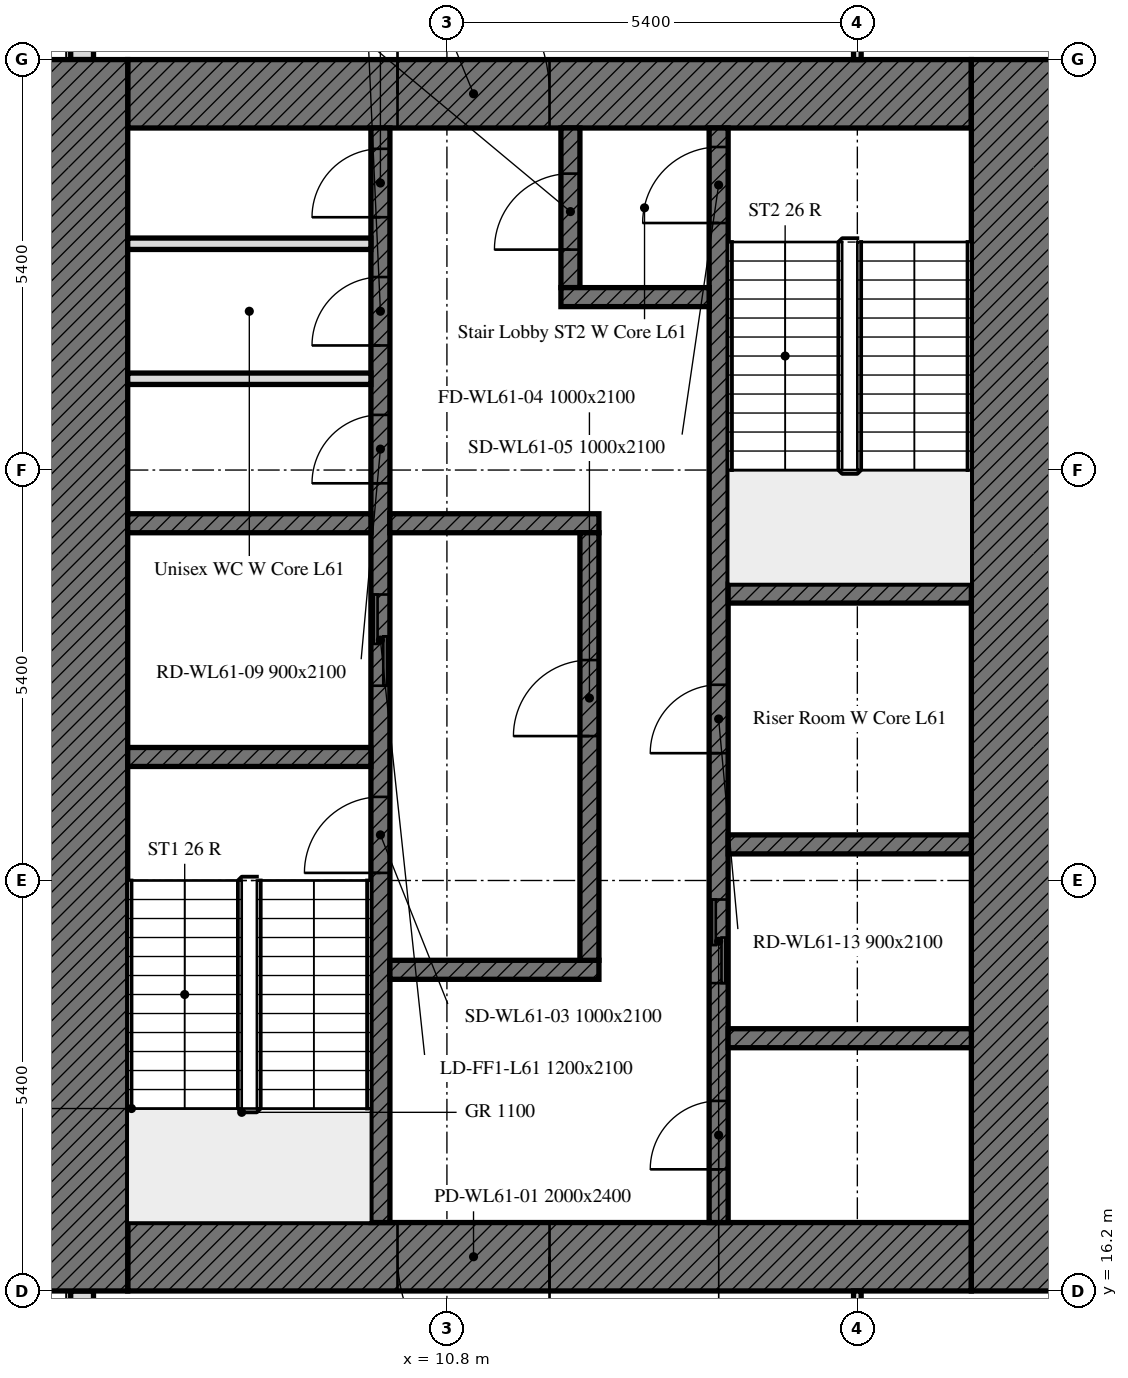
"""IFC4 building model, lengths in metres.
Left out: names, types, materials, properties, quantities, classifications, styles, units other than length and angle.
Written with IfcOpenShell. Run it as: python <this file> out.ifc"""

import sys

from ifc_helpers import new_model, si_unit, direction, frame, frame_2d, origin, place, context, subcontext, project, spatial, rectangle, extrude, element, fill, save


model = new_model("IFC4")
c1 = context("Model", 3, precision=1e-05, world=origin(), true_north=direction((0.0, 1.0)))
c2 = subcontext(c1, "Body", "Model", "MODEL_VIEW")
j1 = project(units=[si_unit("LENGTHUNIT", "METRE"), si_unit("PLANEANGLEUNIT", "RADIAN")], contexts=[c1])
p1 = place(None, origin())
s1 = spatial("IfcSite", under=j1, at=p1, CompositionType="ELEMENT")
p2 = place(p1, origin())
s2 = spatial("IfcBuilding", under=s1, at=p2, CompositionType="ELEMENT")
p3 = place(p2, frame((0.0, 0.0, 250.9)))
s3 = spatial("IfcBuildingStorey", under=s2, at=p3, CompositionType="ELEMENT", Elevation=250.9)
p4 = place(p3, frame((6.0, 37.8, 0.0), z_axis=(0.0, 0.0, 1.0), x_axis=(0.0, -1.0, 0.0)))
e1 = element("IfcWall", 1, at=p4, inside=s3, PredefinedType="SOLIDWALL", context=c2, shape_type="SweptSolid", body=[
    extrude(rectangle(XDim=5.4, YDim=0.3, at=frame_2d((2.7, 0.0))), origin(), (0.0, 0.0, 1.0), 4.5),
])
p5 = place(p4, frame((1.0, 0.0, 0.0)))
e2 = element("IfcOpeningElement", 2, at=p5, cuts=e1, PredefinedType="OPENING", context=c2, shape_type="SweptSolid", body=[
    extrude(rectangle(XDim=1.2, YDim=2.4, at=frame_2d((0.6, 1.2))), frame((0.0, 0.16, 0.0), z_axis=(0.0, -1.0, 0.0), x_axis=(1.0, 0.0, 0.0)), (0.0, 0.0, 1.0), 0.32),
])
p6 = place(p3, frame((6.0, 16.2, 0.0), z_axis=(0.0, 0.0, 1.0), x_axis=(0.0, -1.0, 0.0)))
e3 = element("IfcWall", 3, at=p6, inside=s3, PredefinedType="SOLIDWALL", context=c2, shape_type="SweptSolid", body=[
    extrude(rectangle(XDim=5.4, YDim=0.3, at=frame_2d((2.7, 0.0))), origin(), (0.0, 0.0, 1.0), 4.5),
])
p7 = place(p6, frame((3.2, 0.0, 0.0)))
e4 = element("IfcOpeningElement", 4, at=p7, cuts=e3, PredefinedType="OPENING", context=c2, shape_type="SweptSolid", body=[
    extrude(rectangle(XDim=1.2, YDim=2.4, at=frame_2d((0.6, 1.2))), frame((0.0, 0.16, 0.0), z_axis=(0.0, -1.0, 0.0), x_axis=(1.0, 0.0, 0.0)), (0.0, 0.0, 1.0), 0.32),
])
p8 = place(p3, frame((17.7, 16.65, 0.0), z_axis=(0.0, 0.0, 1.0), x_axis=(-1.0, 0.0, 0.0)))
e5 = element("IfcWall", 5, at=p8, inside=s3, PredefinedType="SOLIDWALL", context=c2, shape_type="SweptSolid", body=[
    extrude(rectangle(XDim=11.1, YDim=0.9, at=frame_2d((5.55, 0.0))), origin(), (0.0, 0.0, 1.0), 4.5),
])
p9 = place(p8, frame((5.55, 0.0, 0.0)))
e6 = element("IfcOpeningElement", 6, at=p9, cuts=e5, PredefinedType="OPENING", context=c2, shape_type="SweptSolid", body=[
    extrude(rectangle(XDim=2.0, YDim=2.4, at=frame_2d((1.0, 1.2))), frame((0.0, 0.45, 0.0), z_axis=(0.0, -1.0, 0.0), x_axis=(1.0, 0.0, 0.0)), (0.0, 0.0, 1.0), 0.9),
])
p10 = place(p3, frame((6.6, 31.95, 0.0), z_axis=(0.0, 0.0, 1.0), x_axis=(1.0, 0.0, 0.0)))
e7 = element("IfcWall", 7, at=p10, inside=s3, PredefinedType="SOLIDWALL", context=c2, shape_type="SweptSolid", body=[
    extrude(rectangle(XDim=11.1, YDim=0.9, at=frame_2d((5.55, 0.0))), origin(), (0.0, 0.0, 1.0), 4.5),
])
p11 = place(p10, frame((3.55, 0.0, 0.0)))
e8 = element("IfcOpeningElement", 8, at=p11, cuts=e7, PredefinedType="OPENING", context=c2, shape_type="SweptSolid", body=[
    extrude(rectangle(XDim=2.0, YDim=2.4, at=frame_2d((1.0, 1.2))), frame((0.0, 0.45, 0.0), z_axis=(0.0, -1.0, 0.0), x_axis=(1.0, 0.0, 0.0)), (0.0, 0.0, 1.0), 0.9),
])
for number, where, z_axis, x_axis in (
    (9, (6.0, 16.2, 0.0), (0.0, 0.0, 1.0), (0.0, 1.0, 0.0)),
    (10, (18.3, 32.4, 0.0), (0.0, 0.0, 1.0), (0.0, -1.0, 0.0)),
):
    element("IfcWall", number, at=place(p3, frame(where, z_axis=z_axis, x_axis=x_axis)), inside=s3, PredefinedType="SOLIDWALL", context=c2, shape_type="SweptSolid", body=[
        extrude(rectangle(XDim=16.2, YDim=1.2, at=frame_2d((8.1, 0.0))), origin(), (0.0, 0.0, 1.0), 4.5),
    ])
p12 = place(p3, frame((9.925, 17.1, 0.0), z_axis=(0.0, 0.0, 1.0), x_axis=(0.0, 1.0, 0.0)))
e11 = element("IfcWall", 11, at=p12, inside=s3, PredefinedType="SOLIDWALL", context=c2, shape_type="SweptSolid", body=[
    extrude(rectangle(XDim=14.4, YDim=0.25, at=frame_2d((7.2, 0.0))), origin(), (0.0, 0.0, 1.0), 4.5),
])
p13 = place(p12, frame((4.6, 0.0, 0.0)))
e12 = element("IfcOpeningElement", 12, at=p13, cuts=e11, PredefinedType="OPENING", context=c2, shape_type="SweptSolid", body=[
    extrude(rectangle(XDim=1.0, YDim=2.1, at=frame_2d((0.5, 1.05))), frame((0.0, 0.125, 0.0), z_axis=(0.0, -1.0, 0.0), x_axis=(1.0, 0.0, 0.0)), (0.0, 0.0, 1.0), 0.25),
])
p14 = place(p12, frame((7.062, 0.0, 0.0)))
e13 = element("IfcOpeningElement", 13, at=p14, cuts=e11, PredefinedType="OPENING", context=c2, shape_type="SweptSolid", body=[
    extrude(rectangle(XDim=1.2, YDim=2.1, at=frame_2d((0.6, 1.05))), frame((0.0, 0.125, 0.0), z_axis=(0.0, -1.0, 0.0), x_axis=(1.0, 0.0, 0.0)), (0.0, 0.0, 1.0), 0.25),
])
p15 = place(p12, frame((9.726, 0.0, 0.0)))
e14 = element("IfcOpeningElement", 14, at=p15, cuts=e11, PredefinedType="OPENING", context=c2, shape_type="SweptSolid", body=[
    extrude(rectangle(XDim=0.9, YDim=2.1, at=frame_2d((0.45, 1.05))), frame((0.0, 0.125, 0.0), z_axis=(0.0, -1.0, 0.0), x_axis=(1.0, 0.0, 0.0)), (0.0, 0.0, 1.0), 0.25),
])
p16 = place(p12, frame((11.539, 0.0, 0.0)))
e15 = element("IfcOpeningElement", 15, at=p16, cuts=e11, PredefinedType="OPENING", context=c2, shape_type="SweptSolid", body=[
    extrude(rectangle(XDim=0.9, YDim=2.1, at=frame_2d((0.45, 1.05))), frame((0.0, 0.125, 0.0), z_axis=(0.0, -1.0, 0.0), x_axis=(1.0, 0.0, 0.0)), (0.0, 0.0, 1.0), 0.25),
])
p17 = place(p12, frame((13.226, 0.0, 0.0)))
e16 = element("IfcOpeningElement", 16, at=p17, cuts=e11, PredefinedType="OPENING", context=c2, shape_type="SweptSolid", body=[
    extrude(rectangle(XDim=0.9, YDim=2.1, at=frame_2d((0.45, 1.05))), frame((0.0, 0.125, 0.0), z_axis=(0.0, -1.0, 0.0), x_axis=(1.0, 0.0, 0.0)), (0.0, 0.0, 1.0), 0.25),
])
p18 = place(p3, frame((14.375, 17.1, 0.0), z_axis=(0.0, 0.0, 1.0), x_axis=(0.0, 1.0, 0.0)))
e17 = element("IfcWall", 17, at=p18, inside=s3, PredefinedType="SOLIDWALL", context=c2, shape_type="SweptSolid", body=[
    extrude(rectangle(XDim=14.4, YDim=0.25, at=frame_2d((7.2, 0.0))), origin(), (0.0, 0.0, 1.0), 4.5),
])
p19 = place(p18, frame((13.15, 0.0, 0.0)))
e18 = element("IfcOpeningElement", 18, at=p19, cuts=e17, PredefinedType="OPENING", context=c2, shape_type="SweptSolid", body=[
    extrude(rectangle(XDim=1.0, YDim=2.1, at=frame_2d((0.5, 1.05))), frame((0.0, 0.125, 0.0), z_axis=(0.0, -1.0, 0.0), x_axis=(1.0, 0.0, 0.0)), (0.0, 0.0, 1.0), 0.25),
])
p20 = place(p18, frame((3.15, 0.0, 0.0)))
e19 = element("IfcOpeningElement", 19, at=p20, cuts=e17, PredefinedType="OPENING", context=c2, shape_type="SweptSolid", body=[
    extrude(rectangle(XDim=1.1, YDim=2.1, at=frame_2d((0.55, 1.05))), frame((0.0, 0.125, 0.0), z_axis=(0.0, -1.0, 0.0), x_axis=(1.0, 0.0, 0.0)), (0.0, 0.0, 1.0), 0.25),
])
p21 = place(p18, frame((0.7, 0.0, 0.0)))
e20 = element("IfcOpeningElement", 20, at=p21, cuts=e17, PredefinedType="OPENING", context=c2, shape_type="SweptSolid", body=[
    extrude(rectangle(XDim=0.9, YDim=2.1, at=frame_2d((0.45, 1.05))), frame((0.0, 0.125, 0.0), z_axis=(0.0, -1.0, 0.0), x_axis=(1.0, 0.0, 0.0)), (0.0, 0.0, 1.0), 0.25),
])
p22 = place(p18, frame((6.175, 0.0, 0.0)))
e21 = element("IfcOpeningElement", 21, at=p22, cuts=e17, PredefinedType="OPENING", context=c2, shape_type="SweptSolid", body=[
    extrude(rectangle(XDim=0.9, YDim=2.1, at=frame_2d((0.45, 1.05))), frame((0.0, 0.125, 0.0), z_axis=(0.0, -1.0, 0.0), x_axis=(1.0, 0.0, 0.0)), (0.0, 0.0, 1.0), 0.25),
])
for number, where, z_axis, x_axis in (
    (22, (6.6, 23.225, 0.0), (0.0, 0.0, 1.0), (1.0, 0.0, 0.0)),
    (23, (14.5, 25.375, 0.0), (0.0, 0.0, 1.0), (1.0, 0.0, 0.0)),
    (24, (14.5, 22.075, 0.0), (0.0, 0.0, 1.0), (1.0, 0.0, 0.0)),
    (25, (6.6, 26.3, 0.0), (0.0, 0.0, 1.0), (1.0, 0.0, 0.0)),
):
    element("IfcWall", number, at=place(p3, frame(where, z_axis=z_axis, x_axis=x_axis)), inside=s3, PredefinedType="SOLIDWALL", context=c2, shape_type="SweptSolid", body=[
        extrude(rectangle(XDim=3.2, YDim=0.25, at=frame_2d((1.6, 0.0))), origin(), (0.0, 0.0, 1.0), 4.5),
    ])
for number, where, z_axis, x_axis in (
    (26, (10.05, 26.3, 0.0), (0.0, 0.0, 1.0), (1.0, 0.0, 0.0)),
    (27, (10.05, 20.425, 0.0), (0.0, 0.0, 1.0), (1.0, 0.0, 0.0)),
):
    element("IfcWall", number, at=place(p3, frame(where, z_axis=z_axis, x_axis=x_axis)), inside=s3, PredefinedType="SOLIDWALL", context=c2, shape_type="SweptSolid", body=[
        extrude(rectangle(XDim=2.75, YDim=0.25, at=frame_2d((1.375, 0.0))), origin(), (0.0, 0.0, 1.0), 4.5),
    ])
p23 = place(p3, frame((12.425, 29.4, 0.0), z_axis=(0.0, 0.0, 1.0), x_axis=(0.0, 1.0, 0.0)))
e28 = element("IfcWall", 28, at=p23, inside=s3, PredefinedType="SOLIDWALL", context=c2, shape_type="SweptSolid", body=[
    extrude(rectangle(XDim=2.1, YDim=0.25, at=frame_2d((1.05, 0.0))), origin(), (0.0, 0.0, 1.0), 4.5),
])
p24 = place(p23, frame((0.5, 0.0, 0.0)))
e29 = element("IfcOpeningElement", 29, at=p24, cuts=e28, PredefinedType="OPENING", context=c2, shape_type="SweptSolid", body=[
    extrude(rectangle(XDim=1.0, YDim=2.1, at=frame_2d((0.5, 1.05))), frame((0.0, 0.125, 0.0), z_axis=(0.0, -1.0, 0.0), x_axis=(1.0, 0.0, 0.0)), (0.0, 0.0, 1.0), 0.25),
])
p25 = place(p3, frame((12.3, 29.275, 0.0), z_axis=(0.0, 0.0, 1.0), x_axis=(1.0, 0.0, 0.0)))
e30 = element("IfcWall", 30, at=p25, inside=s3, PredefinedType="SOLIDWALL", context=c2, shape_type="SweptSolid", body=[
    extrude(rectangle(XDim=1.95, YDim=0.25, at=frame_2d((0.975, 0.0))), origin(), (0.0, 0.0, 1.0), 4.5),
])
p26 = place(p3, frame((12.675, 20.55, 0.0), z_axis=(0.0, 0.0, 1.0), x_axis=(0.0, 1.0, 0.0)))
e31 = element("IfcWall", 31, at=p26, inside=s3, PredefinedType="SOLIDWALL", context=c2, shape_type="SweptSolid", body=[
    extrude(rectangle(XDim=5.625, YDim=0.25, at=frame_2d((2.812, 0.0))), origin(), (0.0, 0.0, 1.0), 4.5),
])
p27 = place(p26, frame((2.95, 0.0, 0.0)))
e32 = element("IfcOpeningElement", 32, at=p27, cuts=e31, PredefinedType="OPENING", context=c2, shape_type="SweptSolid", body=[
    extrude(rectangle(XDim=1.0, YDim=2.1, at=frame_2d((0.5, 1.05))), frame((0.0, 0.125, 0.0), z_axis=(0.0, -1.0, 0.0), x_axis=(1.0, 0.0, 0.0)), (0.0, 0.0, 1.0), 0.25),
])
p28 = place(p3, frame((14.5, 19.525, 0.0), z_axis=(0.0, 0.0, 1.0), x_axis=(1.0, 0.0, 0.0)))
e33 = element("IfcWall", 33, at=p28, inside=s3, PredefinedType="SOLIDWALL", context=c2, shape_type="SweptSolid", body=[
    extrude(rectangle(XDim=3.2, YDim=0.25, at=frame_2d((1.6, 0.0))), origin(), (0.0, 0.0, 1.0), 4.5),
])
for number, where, z_axis, x_axis in (
    (34, (6.6, 28.201, 0.0), (0.0, 0.0, 1.0), (1.0, 0.0, 0.0)),
    (35, (6.6, 29.977, 0.0), (0.0, 0.0, 1.0), (1.0, 0.0, 0.0)),
):
    element("IfcWall", number, at=place(p3, frame(where, z_axis=z_axis, x_axis=x_axis)), inside=s3, PredefinedType="PARTITIONING", context=c2, shape_type="SweptSolid", body=[
        extrude(rectangle(XDim=3.2, YDim=0.15, at=frame_2d((1.6, 0.0))), origin(), (0.0, 0.0, 1.0), 4.5),
    ])
p29 = place(p3, frame((16.2, 35.475, 0.0), z_axis=(0.0, 0.0, 1.0), x_axis=(0.0, -1.0, 0.0)))
e36 = element("IfcWall", 36, at=p29, inside=s3, PredefinedType="PARTITIONING", context=c2, shape_type="SweptSolid", body=[
    extrude(rectangle(XDim=3.075, YDim=0.1, at=frame_2d((1.538, 0.0))), origin(), (0.0, 0.0, 1.0), 3.75),
])
p30 = place(p3, frame((16.2, 16.2, 0.0), z_axis=(0.0, 0.0, 1.0), x_axis=(0.0, -1.0, 0.0)))
e37 = element("IfcWall", 37, at=p30, inside=s3, PredefinedType="PARTITIONING", context=c2, shape_type="SweptSolid", body=[
    extrude(rectangle(XDim=3.075, YDim=0.1, at=frame_2d((1.538, 0.0))), origin(), (0.0, 0.0, 1.0), 3.75),
])
p31 = place(p9, origin())
e38 = element("IfcDoor", 38, at=p31, inside=s3, OperationType="DOUBLE_DOOR_SINGLE_SWING", PredefinedType="DOOR", context=c2, shape_type="SweptSolid", body=[
    extrude(rectangle(XDim=2.0, YDim=2.4, at=frame_2d((1.0, 1.2))), frame((0.0, 0.025, 0.0), z_axis=(0.0, -1.0, 0.0), x_axis=(1.0, 0.0, 0.0)), (0.0, 0.0, 1.0), 0.05),
])
fill(e6, e38)
p32 = place(p11, origin())
e39 = element("IfcDoor", 39, at=p32, inside=s3, OperationType="DOUBLE_DOOR_SINGLE_SWING", PredefinedType="DOOR", context=c2, shape_type="SweptSolid", body=[
    extrude(rectangle(XDim=2.0, YDim=2.4, at=frame_2d((1.0, 1.2))), frame((0.0, 0.025, 0.0), z_axis=(0.0, -1.0, 0.0), x_axis=(1.0, 0.0, 0.0)), (0.0, 0.0, 1.0), 0.05),
])
fill(e8, e39)
p33 = place(p13, origin())
e40 = element("IfcDoor", 40, at=p33, inside=s3, OperationType="SINGLE_SWING_LEFT", PredefinedType="DOOR", context=c2, shape_type="SweptSolid", body=[
    extrude(rectangle(XDim=1.0, YDim=2.1, at=frame_2d((0.5, 1.05))), frame((0.0, 0.025, 0.0), z_axis=(0.0, -1.0, 0.0), x_axis=(1.0, 0.0, 0.0)), (0.0, 0.0, 1.0), 0.05),
])
fill(e12, e40)
p34 = place(p27, origin())
e41 = element("IfcDoor", 41, at=p34, inside=s3, OperationType="SINGLE_SWING_LEFT", PredefinedType="DOOR", context=c2, shape_type="SweptSolid", body=[
    extrude(rectangle(XDim=1.0, YDim=2.1, at=frame_2d((0.5, 1.05))), frame((0.0, 0.025, 0.0), z_axis=(0.0, -1.0, 0.0), x_axis=(1.0, 0.0, 0.0)), (0.0, 0.0, 1.0), 0.05),
])
fill(e32, e41)
p35 = place(p19, origin())
e42 = element("IfcDoor", 42, at=p35, inside=s3, OperationType="SINGLE_SWING_LEFT", PredefinedType="DOOR", context=c2, shape_type="SweptSolid", body=[
    extrude(rectangle(XDim=1.0, YDim=2.1, at=frame_2d((0.5, 1.05))), frame((0.0, 0.025, 0.0), z_axis=(0.0, -1.0, 0.0), x_axis=(1.0, 0.0, 0.0)), (0.0, 0.0, 1.0), 0.05),
])
fill(e18, e42)
p36 = place(p24, origin())
e43 = element("IfcDoor", 43, at=p36, inside=s3, OperationType="SINGLE_SWING_LEFT", PredefinedType="DOOR", context=c2, shape_type="SweptSolid", body=[
    extrude(rectangle(XDim=1.0, YDim=2.1, at=frame_2d((0.5, 1.05))), frame((0.0, 0.025, 0.0), z_axis=(0.0, -1.0, 0.0), x_axis=(1.0, 0.0, 0.0)), (0.0, 0.0, 1.0), 0.05),
])
fill(e29, e43)
p37 = place(p14, origin())
e44 = element("IfcDoor", 44, at=p37, inside=s3, OperationType="DOUBLE_DOOR_SLIDING", PredefinedType="DOOR", context=c2, shape_type="SweptSolid", body=[
    extrude(rectangle(XDim=1.2, YDim=2.1, at=frame_2d((0.6, 1.05))), frame((0.0, 0.025, 0.0), z_axis=(0.0, -1.0, 0.0), x_axis=(1.0, 0.0, 0.0)), (0.0, 0.0, 1.0), 0.05),
])
fill(e13, e44)
p38 = place(p20, origin())
e45 = element("IfcDoor", 45, at=p38, inside=s3, OperationType="DOUBLE_DOOR_SLIDING", PredefinedType="DOOR", context=c2, shape_type="SweptSolid", body=[
    extrude(rectangle(XDim=1.1, YDim=2.1, at=frame_2d((0.55, 1.05))), frame((0.0, 0.025, 0.0), z_axis=(0.0, -1.0, 0.0), x_axis=(1.0, 0.0, 0.0)), (0.0, 0.0, 1.0), 0.05),
])
fill(e19, e45)
p39 = place(p15, origin())
e46 = element("IfcDoor", 46, at=p39, inside=s3, OperationType="SINGLE_SWING_LEFT", PredefinedType="DOOR", context=c2, shape_type="SweptSolid", body=[
    extrude(rectangle(XDim=0.9, YDim=2.1, at=frame_2d((0.45, 1.05))), frame((0.0, 0.025, 0.0), z_axis=(0.0, -1.0, 0.0), x_axis=(1.0, 0.0, 0.0)), (0.0, 0.0, 1.0), 0.05),
])
fill(e14, e46)
p40 = place(p16, origin())
e47 = element("IfcDoor", 47, at=p40, inside=s3, OperationType="SINGLE_SWING_LEFT", PredefinedType="DOOR", context=c2, shape_type="SweptSolid", body=[
    extrude(rectangle(XDim=0.9, YDim=2.1, at=frame_2d((0.45, 1.05))), frame((0.0, 0.025, 0.0), z_axis=(0.0, -1.0, 0.0), x_axis=(1.0, 0.0, 0.0)), (0.0, 0.0, 1.0), 0.05),
])
fill(e15, e47)
p41 = place(p17, origin())
e48 = element("IfcDoor", 48, at=p41, inside=s3, OperationType="SINGLE_SWING_LEFT", PredefinedType="DOOR", context=c2, shape_type="SweptSolid", body=[
    extrude(rectangle(XDim=0.9, YDim=2.1, at=frame_2d((0.45, 1.05))), frame((0.0, 0.025, 0.0), z_axis=(0.0, -1.0, 0.0), x_axis=(1.0, 0.0, 0.0)), (0.0, 0.0, 1.0), 0.05),
])
fill(e16, e48)
p42 = place(p21, origin())
e49 = element("IfcDoor", 49, at=p42, inside=s3, OperationType="SINGLE_SWING_LEFT", PredefinedType="DOOR", context=c2, shape_type="SweptSolid", body=[
    extrude(rectangle(XDim=0.9, YDim=2.1, at=frame_2d((0.45, 1.05))), frame((0.0, 0.025, 0.0), z_axis=(0.0, -1.0, 0.0), x_axis=(1.0, 0.0, 0.0)), (0.0, 0.0, 1.0), 0.05),
])
fill(e20, e49)
p43 = place(p22, origin())
e50 = element("IfcDoor", 50, at=p43, inside=s3, OperationType="SINGLE_SWING_LEFT", PredefinedType="DOOR", context=c2, shape_type="SweptSolid", body=[
    extrude(rectangle(XDim=0.9, YDim=2.1, at=frame_2d((0.45, 1.05))), frame((0.0, 0.025, 0.0), z_axis=(0.0, -1.0, 0.0), x_axis=(1.0, 0.0, 0.0)), (0.0, 0.0, 1.0), 0.05),
])
fill(e21, e50)
save(model, sys.argv[1])
